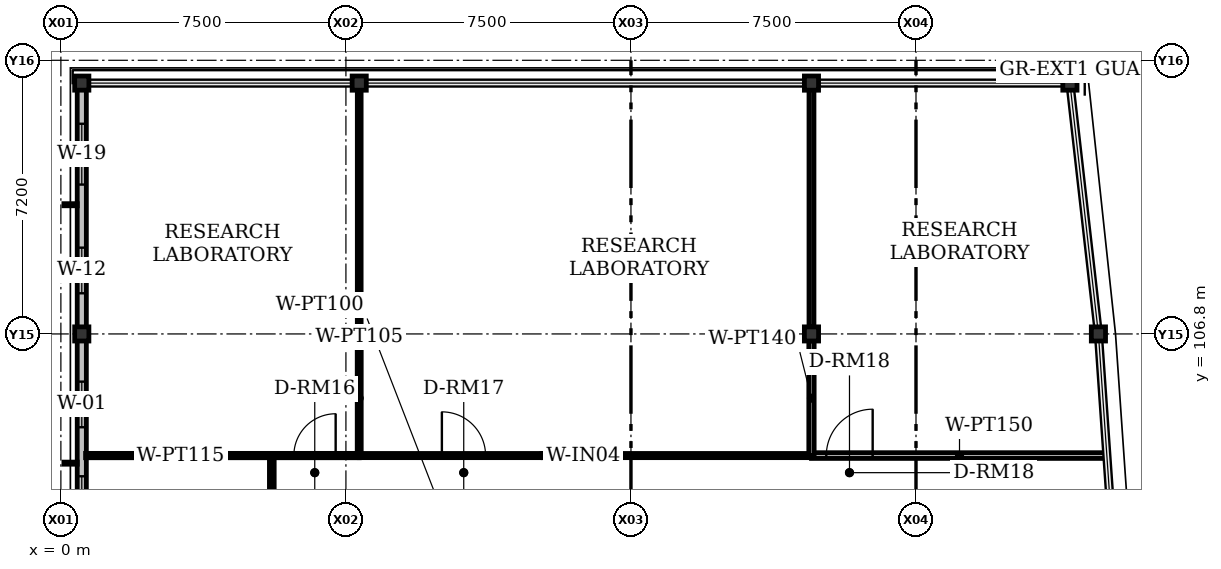
"""IFC4 building model, lengths in metres.
Left out: names, types, materials, properties, quantities, classifications, styles, units other than length and angle.
Written with IfcOpenShell. Run it as: python <this file> out.ifc"""

import sys

from ifc_helpers import new_model, si_unit, direction, frame, frame_2d, origin, origin_2d, place, context, subcontext, project, spatial, rectangle, i_section, extrude, element, fill, save


model = new_model("IFC4")
c1 = context("Model", 3, precision=1e-05, world=origin(), true_north=direction((0.0, 1.0)))
c2 = subcontext(c1, "Body", "Model", "MODEL_VIEW")
j1 = project(units=[si_unit("LENGTHUNIT", "METRE"), si_unit("PLANEANGLEUNIT", "RADIAN")], contexts=[c1])
p1 = place(None, origin())
s1 = spatial("IfcSite", under=j1, at=p1, CompositionType="ELEMENT")
p2 = place(p1, origin())
s2 = spatial("IfcBuilding", under=s1, at=p2, CompositionType="ELEMENT")
p3 = place(p2, frame((0.0, 0.0, 22.5)))
s3 = spatial("IfcBuildingStorey", under=s2, at=p3, CompositionType="ELEMENT", Elevation=22.5)
for number, where, z_axis, x_axis in (
    (1, (0.55, 106.8, 0.0), (0.0, 0.0, 1.0), (1.0, 0.0, 0.0)),
    (2, (7.85, 106.8, 0.0), (0.0, 0.0, 1.0), (1.0, 0.0, 0.0)),
    (3, (19.75, 106.8, 0.0), (0.0, 0.0, 1.0), (1.0, 0.0, 0.0)),
    (4, (27.3, 106.8, 0.0), (0.0, 0.0, 1.0), (1.0, 0.0, 0.0)),
    (5, (0.55, 113.4, 0.0), (0.0, 0.0, 1.0), (1.0, 0.0, 0.0)),
    (6, (7.85, 113.4, 0.0), (0.0, 0.0, 1.0), (0.0, 1.0, 0.0)),
    (7, (19.75, 113.4, 0.0), (0.0, 0.0, 1.0), (0.0, 1.0, 0.0)),
    (8, (26.55, 113.4, 0.0), (0.0, 0.0, 1.0), (1.0, 0.0, 0.0)),
):
    element("IfcColumn", number, at=place(p3, frame(where, z_axis=z_axis, x_axis=x_axis)), inside=s3, PredefinedType="COLUMN", context=c2, shape_type="SweptSolid", body=[
        extrude(i_section(OverallWidth=0.374, OverallDepth=0.372, WebThickness=0.016, FlangeThickness=0.026, FilletRadius=0.015, at=origin_2d()), origin(), (0.0, 0.0, 1.0), 4.2),
    ])
p4 = place(p3, frame((0.55, 99.6, 0.0), z_axis=(0.0, 0.0, 1.0), x_axis=(0.0, 1.0, 0.0)))
e9 = element("IfcWall", 9, at=p4, inside=s3, PredefinedType="SOLIDWALL", context=c2, shape_type="SweptSolid", body=[
    extrude(rectangle(XDim=7.2, YDim=0.24, at=frame_2d((3.6, 0.0))), origin(), (0.0, 0.0, 1.0), 3.557),
])
p5 = place(p4, frame((1.055, 0.0, 0.92)))
e10 = element("IfcOpeningElement", 10, at=p5, cuts=e9, PredefinedType="OPENING", context=c2, shape_type="SweptSolid", body=[
    extrude(rectangle(XDim=2.4, YDim=1.55, at=frame_2d((1.2, 0.775))), frame((0.0, 0.12, 0.0), z_axis=(0.0, -1.0, 0.0), x_axis=(1.0, 0.0, 0.0)), (0.0, 0.0, 1.0), 0.24),
])
p6 = place(p4, frame((4.745, 0.0, 0.92)))
e11 = element("IfcOpeningElement", 11, at=p6, cuts=e9, PredefinedType="OPENING", context=c2, shape_type="SweptSolid", body=[
    extrude(rectangle(XDim=1.2, YDim=1.4, at=frame_2d((0.6, 0.7))), frame((0.0, 0.12, 0.0), z_axis=(0.0, -1.0, 0.0), x_axis=(1.0, 0.0, 0.0)), (0.0, 0.0, 1.0), 0.24),
])
p7 = place(p3, frame((0.55, 106.8, 0.0), z_axis=(0.0, 0.0, 1.0), x_axis=(0.0, 1.0, 0.0)))
e12 = element("IfcWall", 12, at=p7, inside=s3, PredefinedType="SOLIDWALL", context=c2, shape_type="SweptSolid", body=[
    extrude(rectangle(XDim=6.6, YDim=0.24, at=frame_2d((3.3, 0.0))), origin(), (0.0, 0.0, 1.0), 3.557),
])
p8 = place(p7, frame((1.07, 0.0, 0.92)))
e13 = element("IfcOpeningElement", 13, at=p8, cuts=e12, PredefinedType="OPENING", context=c2, shape_type="SweptSolid", body=[
    extrude(rectangle(XDim=1.2, YDim=1.7, at=frame_2d((0.6, 0.85))), frame((0.0, 0.12, 0.0), z_axis=(0.0, -1.0, 0.0), x_axis=(1.0, 0.0, 0.0)), (0.0, 0.0, 1.0), 0.24),
])
p9 = place(p7, frame((3.93, 0.0, 0.92)))
e14 = element("IfcOpeningElement", 14, at=p9, cuts=e12, PredefinedType="OPENING", context=c2, shape_type="SweptSolid", body=[
    extrude(rectangle(XDim=1.6, YDim=1.35, at=frame_2d((0.8, 0.675))), frame((0.0, 0.12, 0.0), z_axis=(0.0, -1.0, 0.0), x_axis=(1.0, 0.0, 0.0)), (0.0, 0.0, 1.0), 0.24),
])
p10 = place(p3, frame((5.55, 85.2, 0.0), z_axis=(0.0, 0.0, 1.0), x_axis=(0.0, 1.0, 0.0)))
e15 = element("IfcWall", 15, at=p10, inside=s3, PredefinedType="PARTITIONING", context=c2, shape_type="SweptSolid", body=[
    extrude(rectangle(XDim=18.4, YDim=0.125, at=frame_2d((9.2, 0.0))), origin(), (0.0, 0.0, 1.0), 3.277),
])
p11 = place(p10, frame((8.675, 0.0, 0.0)))
e16 = element("IfcOpeningElement", 16, at=p11, cuts=e15, PredefinedType="OPENING", context=c2, shape_type="SweptSolid", body=[
    extrude(rectangle(XDim=1.05, YDim=2.2, at=frame_2d((0.525, 1.1))), frame((0.0, 0.062, 0.0), z_axis=(0.0, -1.0, 0.0), x_axis=(1.0, 0.0, 0.0)), (0.0, 0.0, 1.0), 0.125),
])
p12 = place(p10, frame((10.575, 0.0, 0.92)))
e17 = element("IfcOpeningElement", 17, at=p12, cuts=e15, PredefinedType="OPENING", context=c2, shape_type="SweptSolid", body=[
    extrude(rectangle(XDim=1.1, YDim=1.1, at=frame_2d((0.55, 0.55))), frame((0.0, 0.062, 0.0), z_axis=(0.0, -1.0, 0.0), x_axis=(1.0, 0.0, 0.0)), (0.0, 0.0, 1.0), 0.125),
])
p13 = place(p3, frame((0.65, 103.6, 0.0), z_axis=(0.0, 0.0, 1.0), x_axis=(1.0, 0.0, 0.0)))
e18 = element("IfcWall", 18, at=p13, inside=s3, PredefinedType="PARTITIONING", context=c2, shape_type="SweptSolid", body=[
    extrude(rectangle(XDim=7.2, YDim=0.115, at=frame_2d((3.6, 0.0))), origin(), (0.0, 0.0, 1.0), 3.507),
])
p14 = place(p13, frame((5.48, 0.0, 0.0)))
e19 = element("IfcOpeningElement", 19, at=p14, cuts=e18, PredefinedType="OPENING", context=c2, shape_type="SweptSolid", body=[
    extrude(rectangle(XDim=1.1, YDim=2.2, at=frame_2d((0.55, 1.1))), frame((0.0, 0.058, 0.0), z_axis=(0.0, -1.0, 0.0), x_axis=(1.0, 0.0, 0.0)), (0.0, 0.0, 1.0), 0.115),
])
p15 = place(p3, frame((7.85, 103.6, 0.0), z_axis=(0.0, 0.0, 1.0), x_axis=(1.0, 0.0, 0.0)))
e20 = element("IfcWall", 20, at=p15, inside=s3, PredefinedType="PARTITIONING", context=c2, shape_type="SweptSolid", body=[
    extrude(rectangle(XDim=11.9, YDim=0.11, at=frame_2d((5.95, 0.0))), origin(), (0.0, 0.0, 1.0), 3.507),
])
p16 = place(p15, frame((2.175, 0.0, 0.0)))
e21 = element("IfcOpeningElement", 21, at=p16, cuts=e20, PredefinedType="OPENING", context=c2, shape_type="SweptSolid", body=[
    extrude(rectangle(XDim=1.15, YDim=2.2, at=frame_2d((0.575, 1.1))), frame((0.0, 0.055, 0.0), z_axis=(0.0, -1.0, 0.0), x_axis=(1.0, 0.0, 0.0)), (0.0, 0.0, 1.0), 0.11),
])
p17 = place(p15, frame((4.175, 0.0, 0.92)))
e22 = element("IfcOpeningElement", 22, at=p17, cuts=e20, PredefinedType="OPENING", context=c2, shape_type="SweptSolid", body=[
    extrude(rectangle(XDim=1.25, YDim=1.1, at=frame_2d((0.625, 0.55))), frame((0.0, 0.055, 0.0), z_axis=(0.0, -1.0, 0.0), x_axis=(1.0, 0.0, 0.0)), (0.0, 0.0, 1.0), 0.11),
])
p18 = place(p3, frame((7.85, 106.619, 0.0), z_axis=(0.0, 0.0, 1.0), x_axis=(0.0, -1.0, 0.0)))
e23 = element("IfcWall", 23, at=p18, inside=s3, PredefinedType="PARTITIONING", context=c2, shape_type="SweptSolid", body=[
    extrude(rectangle(XDim=3.019, YDim=0.105, at=frame_2d((1.509, 0.0))), origin(), (0.0, 0.0, 1.0), 3.507),
])
p19 = place(p3, frame((7.85, 113.35, 0.0), z_axis=(0.0, 0.0, 1.0), x_axis=(0.0, -1.0, 0.0)))
e24 = element("IfcWall", 24, at=p19, inside=s3, PredefinedType="PARTITIONING", context=c2, shape_type="SweptSolid", body=[
    extrude(rectangle(XDim=6.369, YDim=0.1, at=frame_2d((3.185, 0.0))), origin(), (0.0, 0.0, 1.0), 3.507),
])
p20 = place(p3, frame((19.75, 103.6, 0.0), z_axis=(0.0, 0.0, 1.0), x_axis=(1.0, 0.0, 0.0)))
e25 = element("IfcWall", 25, at=p20, inside=s3, PredefinedType="PARTITIONING", context=c2, shape_type="SweptSolid", body=[
    extrude(rectangle(XDim=7.79, YDim=0.15, at=frame_2d((3.895, 0.0))), origin(), (0.0, 0.0, 1.0), 3.507),
])
p21 = place(p20, frame((0.39, 0.0, 0.0)))
e26 = element("IfcOpeningElement", 26, at=p21, cuts=e25, PredefinedType="OPENING", context=c2, shape_type="SweptSolid", body=[
    extrude(rectangle(XDim=1.22, YDim=2.2, at=frame_2d((0.61, 1.1))), frame((0.0, 0.075, 0.0), z_axis=(0.0, -1.0, 0.0), x_axis=(1.0, 0.0, 0.0)), (0.0, 0.0, 1.0), 0.15),
])
p22 = place(p3, frame((19.75, 106.619, 0.0), z_axis=(0.0, 0.0, 1.0), x_axis=(0.0, -1.0, 0.0)))
e27 = element("IfcWall", 27, at=p22, inside=s3, PredefinedType="PARTITIONING", context=c2, shape_type="SweptSolid", body=[
    extrude(rectangle(XDim=3.019, YDim=0.14, at=frame_2d((1.509, 0.0))), origin(), (0.0, 0.0, 1.0), 3.507),
])
p23 = place(p3, frame((19.75, 113.35, 0.0), z_axis=(0.0, 0.0, 1.0), x_axis=(0.0, -1.0, 0.0)))
e28 = element("IfcWall", 28, at=p23, inside=s3, PredefinedType="PARTITIONING", context=c2, shape_type="SweptSolid", body=[
    extrude(rectangle(XDim=6.369, YDim=0.13, at=frame_2d((3.185, 0.0))), origin(), (0.0, 0.0, 1.0), 3.507),
])
p24 = place(p5, origin())
e29 = element("IfcWindow", 29, at=p24, inside=s3, PartitioningType="DOUBLE_PANEL_VERTICAL", PredefinedType="WINDOW", context=c2, shape_type="SweptSolid", body=[
    extrude(rectangle(XDim=2.4, YDim=1.55, at=frame_2d((1.2, 0.775))), frame((0.0, 0.03, 0.0), z_axis=(0.0, -1.0, 0.0), x_axis=(1.0, 0.0, 0.0)), (0.0, 0.0, 1.0), 0.06),
])
fill(e10, e29)
p25 = place(p6, origin())
e30 = element("IfcWindow", 30, at=p25, inside=s3, PartitioningType="SINGLE_PANEL", PredefinedType="WINDOW", context=c2, shape_type="SweptSolid", body=[
    extrude(rectangle(XDim=1.2, YDim=1.4, at=frame_2d((0.6, 0.7))), frame((0.0, 0.03, 0.0), z_axis=(0.0, -1.0, 0.0), x_axis=(1.0, 0.0, 0.0)), (0.0, 0.0, 1.0), 0.06),
])
fill(e11, e30)
p26 = place(p8, origin())
e31 = element("IfcWindow", 31, at=p26, inside=s3, PartitioningType="SINGLE_PANEL", PredefinedType="WINDOW", context=c2, shape_type="SweptSolid", body=[
    extrude(rectangle(XDim=1.2, YDim=1.7, at=frame_2d((0.6, 0.85))), frame((0.0, 0.03, 0.0), z_axis=(0.0, -1.0, 0.0), x_axis=(1.0, 0.0, 0.0)), (0.0, 0.0, 1.0), 0.06),
])
fill(e13, e31)
p27 = place(p9, origin())
e32 = element("IfcWindow", 32, at=p27, inside=s3, PartitioningType="DOUBLE_PANEL_VERTICAL", PredefinedType="WINDOW", context=c2, shape_type="SweptSolid", body=[
    extrude(rectangle(XDim=1.6, YDim=1.35, at=frame_2d((0.8, 0.675))), frame((0.0, 0.03, 0.0), z_axis=(0.0, -1.0, 0.0), x_axis=(1.0, 0.0, 0.0)), (0.0, 0.0, 1.0), 0.06),
])
fill(e14, e32)
p28 = place(p14, origin())
e33 = element("IfcDoor", 33, at=p28, inside=s3, OperationType="SINGLE_SWING_RIGHT", PredefinedType="DOOR", context=c2, shape_type="SweptSolid", body=[
    extrude(rectangle(XDim=1.1, YDim=2.2, at=frame_2d((0.55, 1.1))), frame((0.0, 0.025, 0.0), z_axis=(0.0, -1.0, 0.0), x_axis=(1.0, 0.0, 0.0)), (0.0, 0.0, 1.0), 0.05),
])
fill(e19, e33)
p29 = place(p16, origin())
e34 = element("IfcDoor", 34, at=p29, inside=s3, OperationType="SINGLE_SWING_LEFT", PredefinedType="DOOR", context=c2, shape_type="SweptSolid", body=[
    extrude(rectangle(XDim=1.15, YDim=2.2, at=frame_2d((0.575, 1.1))), frame((0.0, 0.025, 0.0), z_axis=(0.0, -1.0, 0.0), x_axis=(1.0, 0.0, 0.0)), (0.0, 0.0, 1.0), 0.05),
])
fill(e21, e34)
p30 = place(p17, origin())
e35 = element("IfcWindow", 35, at=p30, inside=s3, PartitioningType="SINGLE_PANEL", PredefinedType="WINDOW", context=c2, shape_type="SweptSolid", body=[
    extrude(rectangle(XDim=1.25, YDim=1.1, at=frame_2d((0.625, 0.55))), frame((0.0, 0.03, 0.0), z_axis=(0.0, -1.0, 0.0), x_axis=(1.0, 0.0, 0.0)), (0.0, 0.0, 1.0), 0.06),
])
fill(e22, e35)
p31 = place(p21, origin())
e36 = element("IfcDoor", 36, at=p31, inside=s3, OperationType="SINGLE_SWING_RIGHT", PredefinedType="DOOR", context=c2, shape_type="SweptSolid", body=[
    extrude(rectangle(XDim=1.22, YDim=2.2, at=frame_2d((0.61, 1.1))), frame((0.0, 0.025, 0.0), z_axis=(0.0, -1.0, 0.0), x_axis=(1.0, 0.0, 0.0)), (0.0, 0.0, 1.0), 0.05),
])
fill(e26, e36)
save(model, sys.argv[1])
